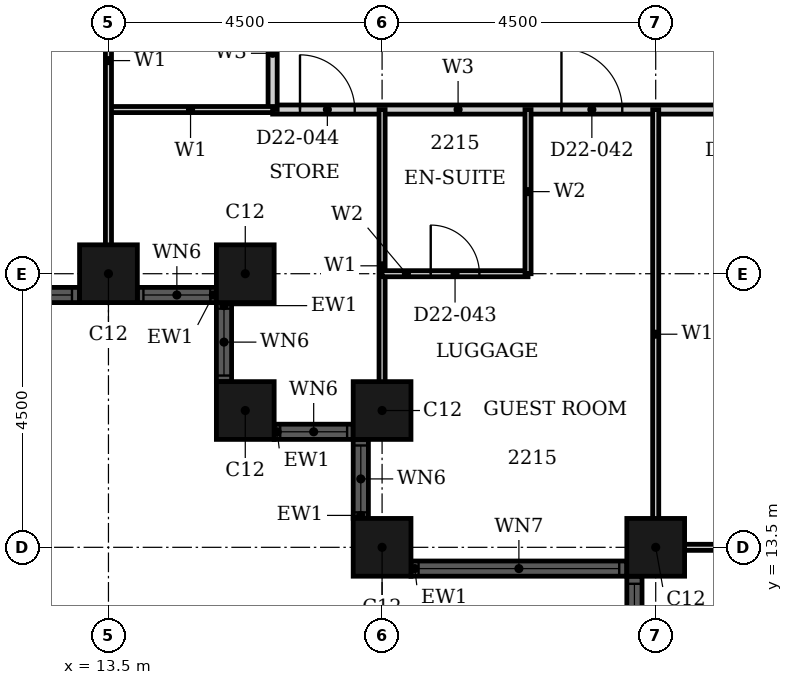
"""IFC4 building model, lengths in metres.
Left out: names, types, materials, properties, quantities, classifications, styles, units other than length and angle.
Written with IfcOpenShell. Run it as: python <this file> out.ifc"""

import sys

from ifc_helpers import new_model, si_unit, direction, frame, frame_2d, origin, origin_2d, place, context, subcontext, project, spatial, rectangle, hollow_rectangle, extrude, element, fill, save


model = new_model("IFC4")
c1 = context("Model", 3, precision=1e-05, world=origin(), true_north=direction((0.0, 1.0)))
c2 = subcontext(c1, "Body", "Model", "MODEL_VIEW")
j1 = project(units=[si_unit("LENGTHUNIT", "METRE"), si_unit("PLANEANGLEUNIT", "RADIAN")], contexts=[c1])
p1 = place(None, origin())
s1 = spatial("IfcSite", under=j1, at=p1, CompositionType="ELEMENT")
p2 = place(p1, origin())
s2 = spatial("IfcBuilding", under=s1, at=p2, CompositionType="ELEMENT")
p3 = place(p2, frame((0.0, 0.0, 92.4)))
s3 = spatial("IfcBuildingStorey", under=s2, at=p3, CompositionType="ELEMENT", Elevation=92.4)
for number, where, z_axis, x_axis in (
    (1, (13.5, 18.0, 0.0), (0.0, 0.0, 1.0), (1.0, 0.0, 0.0)),
    (2, (15.75, 18.0, 0.0), (0.0, 0.0, 1.0), (1.0, 0.0, 0.0)),
    (3, (15.75, 15.75, 0.0), (0.0, 0.0, 1.0), (1.0, 0.0, 0.0)),
    (4, (18.0, 15.75, 0.0), (0.0, 0.0, 1.0), (1.0, 0.0, 0.0)),
    (5, (18.0, 13.5, 0.0), (0.0, 0.0, 1.0), (1.0, 0.0, 0.0)),
    (6, (22.5, 13.5, 0.0), (0.0, 0.0, 1.0), (1.0, 0.0, 0.0)),
):
    element("IfcColumn", number, at=place(p3, frame(where, z_axis=z_axis, x_axis=x_axis)), inside=s3, PredefinedType="COLUMN", context=c2, shape_type="SweptSolid", body=[
        extrude(hollow_rectangle(XDim=0.95, YDim=0.95, WallThickness=0.03, at=origin_2d()), origin(), (0.0, 0.0, 1.0), 3.6),
    ])
p4 = place(p3, frame((4.975, 17.65, 0.0), z_axis=(0.0, 0.0, 1.0), x_axis=(1.0, 0.0, 0.0)))
e7 = element("IfcWall", 7, at=p4, inside=s3, PredefinedType="SOLIDWALL", context=c2, shape_type="SweptSolid", body=[
    extrude(rectangle(XDim=8.05, YDim=0.25, at=frame_2d((4.025, 0.0))), origin(), (0.0, 0.0, 1.0), 3.6),
])
p5 = place(p4, frame((0.125, 0.0, 0.9)))
e8 = element("IfcOpeningElement", 8, at=p5, cuts=e7, PredefinedType="OPENING", context=c2, shape_type="SweptSolid", body=[
    extrude(rectangle(XDim=3.3, YDim=1.85, at=frame_2d((1.65, 0.925))), frame((0.0, 0.135, 0.0), z_axis=(0.0, -1.0, 0.0), x_axis=(1.0, 0.0, 0.0)), (0.0, 0.0, 1.0), 0.27),
])
p6 = place(p4, frame((4.625, 0.0, 0.9)))
e9 = element("IfcOpeningElement", 9, at=p6, cuts=e7, PredefinedType="OPENING", context=c2, shape_type="SweptSolid", body=[
    extrude(rectangle(XDim=3.3, YDim=1.85, at=frame_2d((1.65, 0.925))), frame((0.0, 0.135, 0.0), z_axis=(0.0, -1.0, 0.0), x_axis=(1.0, 0.0, 0.0)), (0.0, 0.0, 1.0), 0.27),
])
p7 = place(p3, frame((13.975, 17.65, 0.0), z_axis=(0.0, 0.0, 1.0), x_axis=(1.0, 0.0, 0.0)))
e10 = element("IfcWall", 10, at=p7, inside=s3, PredefinedType="SOLIDWALL", context=c2, shape_type="SweptSolid", body=[
    extrude(rectangle(XDim=1.3, YDim=0.25, at=frame_2d((0.65, 0.0))), origin(), (0.0, 0.0, 1.0), 3.6),
])
p8 = place(p7, frame((0.1, 0.0, 0.9)))
e11 = element("IfcOpeningElement", 11, at=p8, cuts=e10, PredefinedType="OPENING", context=c2, shape_type="SweptSolid", body=[
    extrude(rectangle(XDim=1.1, YDim=1.85, at=frame_2d((0.55, 0.925))), frame((0.0, 0.135, 0.0), z_axis=(0.0, -1.0, 0.0), x_axis=(1.0, 0.0, 0.0)), (0.0, 0.0, 1.0), 0.27),
])
p9 = place(p3, frame((15.4, 17.525, 0.0), z_axis=(0.0, 0.0, 1.0), x_axis=(0.0, -1.0, 0.0)))
e12 = element("IfcWall", 12, at=p9, inside=s3, PredefinedType="SOLIDWALL", context=c2, shape_type="SweptSolid", body=[
    extrude(rectangle(XDim=1.3, YDim=0.25, at=frame_2d((0.65, 0.0))), origin(), (0.0, 0.0, 1.0), 3.6),
])
p10 = place(p9, frame((0.1, 0.0, 0.9)))
e13 = element("IfcOpeningElement", 13, at=p10, cuts=e12, PredefinedType="OPENING", context=c2, shape_type="SweptSolid", body=[
    extrude(rectangle(XDim=1.1, YDim=1.85, at=frame_2d((0.55, 0.925))), frame((0.0, 0.135, 0.0), z_axis=(0.0, -1.0, 0.0), x_axis=(1.0, 0.0, 0.0)), (0.0, 0.0, 1.0), 0.27),
])
p11 = place(p3, frame((16.225, 15.4, 0.0), z_axis=(0.0, 0.0, 1.0), x_axis=(1.0, 0.0, 0.0)))
e14 = element("IfcWall", 14, at=p11, inside=s3, PredefinedType="SOLIDWALL", context=c2, shape_type="SweptSolid", body=[
    extrude(rectangle(XDim=1.3, YDim=0.25, at=frame_2d((0.65, 0.0))), origin(), (0.0, 0.0, 1.0), 3.6),
])
p12 = place(p11, frame((0.1, 0.0, 0.9)))
e15 = element("IfcOpeningElement", 15, at=p12, cuts=e14, PredefinedType="OPENING", context=c2, shape_type="SweptSolid", body=[
    extrude(rectangle(XDim=1.1, YDim=1.85, at=frame_2d((0.55, 0.925))), frame((0.0, 0.135, 0.0), z_axis=(0.0, -1.0, 0.0), x_axis=(1.0, 0.0, 0.0)), (0.0, 0.0, 1.0), 0.27),
])
p13 = place(p3, frame((17.65, 15.275, 0.0), z_axis=(0.0, 0.0, 1.0), x_axis=(0.0, -1.0, 0.0)))
e16 = element("IfcWall", 16, at=p13, inside=s3, PredefinedType="SOLIDWALL", context=c2, shape_type="SweptSolid", body=[
    extrude(rectangle(XDim=1.3, YDim=0.25, at=frame_2d((0.65, 0.0))), origin(), (0.0, 0.0, 1.0), 3.6),
])
p14 = place(p13, frame((0.1, 0.0, 0.9)))
e17 = element("IfcOpeningElement", 17, at=p14, cuts=e16, PredefinedType="OPENING", context=c2, shape_type="SweptSolid", body=[
    extrude(rectangle(XDim=1.1, YDim=1.85, at=frame_2d((0.55, 0.925))), frame((0.0, 0.135, 0.0), z_axis=(0.0, -1.0, 0.0), x_axis=(1.0, 0.0, 0.0)), (0.0, 0.0, 1.0), 0.27),
])
p15 = place(p3, frame((18.475, 13.15, 0.0), z_axis=(0.0, 0.0, 1.0), x_axis=(1.0, 0.0, 0.0)))
e18 = element("IfcWall", 18, at=p15, inside=s3, PredefinedType="SOLIDWALL", context=c2, shape_type="SweptSolid", body=[
    extrude(rectangle(XDim=3.55, YDim=0.25, at=frame_2d((1.775, 0.0))), origin(), (0.0, 0.0, 1.0), 3.6),
])
p16 = place(p15, frame((0.125, 0.0, 0.9)))
e19 = element("IfcOpeningElement", 19, at=p16, cuts=e18, PredefinedType="OPENING", context=c2, shape_type="SweptSolid", body=[
    extrude(rectangle(XDim=3.3, YDim=1.85, at=frame_2d((1.65, 0.925))), frame((0.0, 0.135, 0.0), z_axis=(0.0, -1.0, 0.0), x_axis=(1.0, 0.0, 0.0)), (0.0, 0.0, 1.0), 0.27),
])
p17 = place(p3, frame((22.15, 13.025, 0.0), z_axis=(0.0, 0.0, 1.0), x_axis=(0.0, -1.0, 0.0)))
e20 = element("IfcWall", 20, at=p17, inside=s3, PredefinedType="SOLIDWALL", context=c2, shape_type="SweptSolid", body=[
    extrude(rectangle(XDim=8.05, YDim=0.25, at=frame_2d((4.025, 0.0))), origin(), (0.0, 0.0, 1.0), 3.6),
])
p18 = place(p17, frame((0.125, 0.0, 0.9)))
e21 = element("IfcOpeningElement", 21, at=p18, cuts=e20, PredefinedType="OPENING", context=c2, shape_type="SweptSolid", body=[
    extrude(rectangle(XDim=3.3, YDim=1.85, at=frame_2d((1.65, 0.925))), frame((0.0, 0.135, 0.0), z_axis=(0.0, -1.0, 0.0), x_axis=(1.0, 0.0, 0.0)), (0.0, 0.0, 1.0), 0.27),
])
p19 = place(p17, frame((4.625, 0.0, 0.9)))
e22 = element("IfcOpeningElement", 22, at=p19, cuts=e20, PredefinedType="OPENING", context=c2, shape_type="SweptSolid", body=[
    extrude(rectangle(XDim=3.3, YDim=1.85, at=frame_2d((1.65, 0.925))), frame((0.0, 0.135, 0.0), z_axis=(0.0, -1.0, 0.0), x_axis=(1.0, 0.0, 0.0)), (0.0, 0.0, 1.0), 0.27),
])
p20 = place(p3, frame((16.2, 20.7, 0.0), z_axis=(0.0, 0.0, 1.0), x_axis=(1.0, 0.0, 0.0)))
e23 = element("IfcWall", 23, at=p20, inside=s3, PredefinedType="PARTITIONING", context=c2, shape_type="SweptSolid", body=[
    extrude(rectangle(XDim=13.5, YDim=0.15, at=frame_2d((6.75, 0.0))), origin(), (0.0, 0.0, 1.0), 3.2),
])
p21 = place(p20, frame((4.75, 0.0, 0.0)))
e24 = element("IfcOpeningElement", 24, at=p21, cuts=e23, PredefinedType="OPENING", context=c2, shape_type="SweptSolid", body=[
    extrude(rectangle(XDim=1.0, YDim=2.1, at=frame_2d((0.5, 1.05))), frame((0.0, 0.085, 0.0), z_axis=(0.0, -1.0, 0.0), x_axis=(1.0, 0.0, 0.0)), (0.0, 0.0, 1.0), 0.17),
])
p22 = place(p20, frame((0.45, 0.0, 0.0)))
e25 = element("IfcOpeningElement", 25, at=p22, cuts=e23, PredefinedType="OPENING", context=c2, shape_type="SweptSolid", body=[
    extrude(rectangle(XDim=0.9, YDim=2.1, at=frame_2d((0.45, 1.05))), frame((0.0, 0.085, 0.0), z_axis=(0.0, -1.0, 0.0), x_axis=(1.0, 0.0, 0.0)), (0.0, 0.0, 1.0), 0.17),
])
p23 = place(p20, frame((7.35, 0.0, 0.0)))
e26 = element("IfcOpeningElement", 26, at=p23, cuts=e23, PredefinedType="OPENING", context=c2, shape_type="SweptSolid", body=[
    extrude(rectangle(XDim=0.9, YDim=2.1, at=frame_2d((0.45, 1.05))), frame((0.0, 0.085, 0.0), z_axis=(0.0, -1.0, 0.0), x_axis=(1.0, 0.0, 0.0)), (0.0, 0.0, 1.0), 0.17),
])
p24 = place(p20, frame((10.95, 0.0, 0.0)))
e27 = element("IfcOpeningElement", 27, at=p24, cuts=e23, PredefinedType="OPENING", context=c2, shape_type="SweptSolid", body=[
    extrude(rectangle(XDim=0.9, YDim=2.1, at=frame_2d((0.45, 1.05))), frame((0.0, 0.085, 0.0), z_axis=(0.0, -1.0, 0.0), x_axis=(1.0, 0.0, 0.0)), (0.0, 0.0, 1.0), 0.17),
])
p25 = place(p3, frame((16.2, 20.7, 0.0), z_axis=(0.0, 0.0, 1.0), x_axis=(0.0, 1.0, 0.0)))
e28 = element("IfcWall", 28, at=p25, inside=s3, PredefinedType="PARTITIONING", context=c2, shape_type="SweptSolid", body=[
    extrude(rectangle(XDim=4.5, YDim=0.15, at=frame_2d((2.25, 0.0))), origin(), (0.0, 0.0, 1.0), 3.2),
])
p26 = place(p25, frame((1.85, 0.0, 0.0)))
e29 = element("IfcOpeningElement", 29, at=p26, cuts=e28, PredefinedType="OPENING", context=c2, shape_type="SweptSolid", body=[
    extrude(rectangle(XDim=0.9, YDim=2.1, at=frame_2d((0.45, 1.05))), frame((0.0, 0.085, 0.0), z_axis=(0.0, -1.0, 0.0), x_axis=(1.0, 0.0, 0.0)), (0.0, 0.0, 1.0), 0.17),
])
p27 = place(p3, frame((22.31, 13.5, 0.0), z_axis=(0.0, 0.0, 1.0), x_axis=(1.0, 0.0, 0.0)))
e30 = element("IfcWall", 30, at=p27, inside=s3, PredefinedType="PARTITIONING", context=c2, shape_type="SweptSolid", body=[
    extrude(rectangle(XDim=7.39, YDim=0.1, at=frame_2d((3.695, 0.0))), origin(), (0.0, 0.0, 1.0), 2.28),
])
p28 = place(p3, frame((13.5, 20.7, 0.0), z_axis=(0.0, 0.0, 1.0), x_axis=(1.0, 0.0, 0.0)))
e31 = element("IfcWall", 31, at=p28, inside=s3, PredefinedType="PARTITIONING", context=c2, shape_type="SweptSolid", body=[
    extrude(rectangle(XDim=2.7, YDim=0.1, at=frame_2d((1.35, 0.0))), origin(), (0.0, 0.0, 1.0), 3.2),
])
p29 = place(p3, frame((13.5, 17.81, 0.0), z_axis=(0.0, 0.0, 1.0), x_axis=(0.0, 1.0, 0.0)))
e32 = element("IfcWall", 32, at=p29, inside=s3, PredefinedType="PARTITIONING", context=c2, shape_type="SweptSolid", body=[
    extrude(rectangle(XDim=7.39, YDim=0.1, at=frame_2d((3.695, 0.0))), origin(), (0.0, 0.0, 1.0), 2.28),
])
p30 = place(p3, frame((18.0, 15.56, 0.0), z_axis=(0.0, 0.0, 1.0), x_axis=(0.0, 1.0, 0.0)))
e33 = element("IfcWall", 33, at=p30, inside=s3, PredefinedType="PARTITIONING", context=c2, shape_type="SweptSolid", body=[
    extrude(rectangle(XDim=5.14, YDim=0.1, at=frame_2d((2.57, 0.0))), origin(), (0.0, 0.0, 1.0), 3.2),
])
p31 = place(p3, frame((22.5, 13.31, 0.0), z_axis=(0.0, 0.0, 1.0), x_axis=(0.0, 1.0, 0.0)))
e34 = element("IfcWall", 34, at=p31, inside=s3, PredefinedType="PARTITIONING", context=c2, shape_type="SweptSolid", body=[
    extrude(rectangle(XDim=7.39, YDim=0.1, at=frame_2d((3.695, 0.0))), origin(), (0.0, 0.0, 1.0), 3.2),
])
p32 = place(p3, frame((18.0, 18.0, 0.0), z_axis=(0.0, 0.0, 1.0), x_axis=(1.0, 0.0, 0.0)))
e35 = element("IfcWall", 35, at=p32, inside=s3, PredefinedType="PARTITIONING", context=c2, shape_type="SweptSolid", body=[
    extrude(rectangle(XDim=2.4, YDim=0.1, at=frame_2d((1.2, 0.0))), origin(), (0.0, 0.0, 1.0), 3.2),
])
p33 = place(p32, frame((0.8, 0.0, 0.0)))
e36 = element("IfcOpeningElement", 36, at=p33, cuts=e35, PredefinedType="OPENING", context=c2, shape_type="SweptSolid", body=[
    extrude(rectangle(XDim=0.8, YDim=2.1, at=frame_2d((0.4, 1.05))), frame((0.0, 0.06, 0.0), z_axis=(0.0, -1.0, 0.0), x_axis=(1.0, 0.0, 0.0)), (0.0, 0.0, 1.0), 0.12),
])
p34 = place(p3, frame((20.4, 18.0, 0.0), z_axis=(0.0, 0.0, 1.0), x_axis=(0.0, 1.0, 0.0)))
e37 = element("IfcWall", 37, at=p34, inside=s3, PredefinedType="PARTITIONING", context=c2, shape_type="SweptSolid", body=[
    extrude(rectangle(XDim=2.7, YDim=0.1, at=frame_2d((1.35, 0.0))), origin(), (0.0, 0.0, 1.0), 3.2),
])
p35 = place(p6, origin())
e38 = element("IfcWindow", 38, at=p35, inside=s3, PartitioningType="SINGLE_PANEL", PredefinedType="WINDOW", context=c2, shape_type="SweptSolid", body=[
    extrude(rectangle(XDim=3.3, YDim=1.85, at=frame_2d((1.65, 0.925))), frame((0.0, 0.03, 0.0), z_axis=(0.0, -1.0, 0.0), x_axis=(1.0, 0.0, 0.0)), (0.0, 0.0, 1.0), 0.06),
])
fill(e9, e38)
p36 = place(p8, origin())
e39 = element("IfcWindow", 39, at=p36, inside=s3, PartitioningType="SINGLE_PANEL", PredefinedType="WINDOW", context=c2, shape_type="SweptSolid", body=[
    extrude(rectangle(XDim=1.1, YDim=1.85, at=frame_2d((0.55, 0.925))), frame((0.0, 0.03, 0.0), z_axis=(0.0, -1.0, 0.0), x_axis=(1.0, 0.0, 0.0)), (0.0, 0.0, 1.0), 0.06),
])
fill(e11, e39)
p37 = place(p10, origin())
e40 = element("IfcWindow", 40, at=p37, inside=s3, PartitioningType="SINGLE_PANEL", PredefinedType="WINDOW", context=c2, shape_type="SweptSolid", body=[
    extrude(rectangle(XDim=1.1, YDim=1.85, at=frame_2d((0.55, 0.925))), frame((0.0, 0.03, 0.0), z_axis=(0.0, -1.0, 0.0), x_axis=(1.0, 0.0, 0.0)), (0.0, 0.0, 1.0), 0.06),
])
fill(e13, e40)
p38 = place(p12, origin())
e41 = element("IfcWindow", 41, at=p38, inside=s3, PartitioningType="SINGLE_PANEL", PredefinedType="WINDOW", context=c2, shape_type="SweptSolid", body=[
    extrude(rectangle(XDim=1.1, YDim=1.85, at=frame_2d((0.55, 0.925))), frame((0.0, 0.03, 0.0), z_axis=(0.0, -1.0, 0.0), x_axis=(1.0, 0.0, 0.0)), (0.0, 0.0, 1.0), 0.06),
])
fill(e15, e41)
p39 = place(p14, origin())
e42 = element("IfcWindow", 42, at=p39, inside=s3, PartitioningType="SINGLE_PANEL", PredefinedType="WINDOW", context=c2, shape_type="SweptSolid", body=[
    extrude(rectangle(XDim=1.1, YDim=1.85, at=frame_2d((0.55, 0.925))), frame((0.0, 0.03, 0.0), z_axis=(0.0, -1.0, 0.0), x_axis=(1.0, 0.0, 0.0)), (0.0, 0.0, 1.0), 0.06),
])
fill(e17, e42)
p40 = place(p16, origin())
e43 = element("IfcWindow", 43, at=p40, inside=s3, PartitioningType="SINGLE_PANEL", PredefinedType="WINDOW", context=c2, shape_type="SweptSolid", body=[
    extrude(rectangle(XDim=3.3, YDim=1.85, at=frame_2d((1.65, 0.925))), frame((0.0, 0.03, 0.0), z_axis=(0.0, -1.0, 0.0), x_axis=(1.0, 0.0, 0.0)), (0.0, 0.0, 1.0), 0.06),
])
fill(e19, e43)
p41 = place(p18, origin())
e44 = element("IfcWindow", 44, at=p41, inside=s3, PartitioningType="SINGLE_PANEL", PredefinedType="WINDOW", context=c2, shape_type="SweptSolid", body=[
    extrude(rectangle(XDim=3.3, YDim=1.85, at=frame_2d((1.65, 0.925))), frame((0.0, 0.03, 0.0), z_axis=(0.0, -1.0, 0.0), x_axis=(1.0, 0.0, 0.0)), (0.0, 0.0, 1.0), 0.06),
])
fill(e21, e44)
p42 = place(p21, origin())
e45 = element("IfcDoor", 45, at=p42, inside=s3, OperationType="SINGLE_SWING_RIGHT", PredefinedType="DOOR", context=c2, shape_type="SweptSolid", body=[
    extrude(rectangle(XDim=1.0, YDim=2.1, at=frame_2d((0.5, 1.05))), frame((0.0, 0.025, 0.0), z_axis=(0.0, -1.0, 0.0), x_axis=(1.0, 0.0, 0.0)), (0.0, 0.0, 1.0), 0.05),
])
fill(e24, e45)
p43 = place(p33, origin())
e46 = element("IfcDoor", 46, at=p43, inside=s3, OperationType="SINGLE_SWING_LEFT", PredefinedType="DOOR", context=c2, shape_type="SweptSolid", body=[
    extrude(rectangle(XDim=0.8, YDim=2.1, at=frame_2d((0.4, 1.05))), frame((0.0, 0.025, 0.0), z_axis=(0.0, -1.0, 0.0), x_axis=(1.0, 0.0, 0.0)), (0.0, 0.0, 1.0), 0.05),
])
fill(e36, e46)
p44 = place(p22, origin())
e47 = element("IfcDoor", 47, at=p44, inside=s3, OperationType="SINGLE_SWING_RIGHT", PredefinedType="DOOR", context=c2, shape_type="SweptSolid", body=[
    extrude(rectangle(XDim=0.9, YDim=2.1, at=frame_2d((0.45, 1.05))), frame((0.0, 0.025, 0.0), z_axis=(0.0, -1.0, 0.0), x_axis=(1.0, 0.0, 0.0)), (0.0, 0.0, 1.0), 0.05),
])
fill(e25, e47)
save(model, sys.argv[1])
